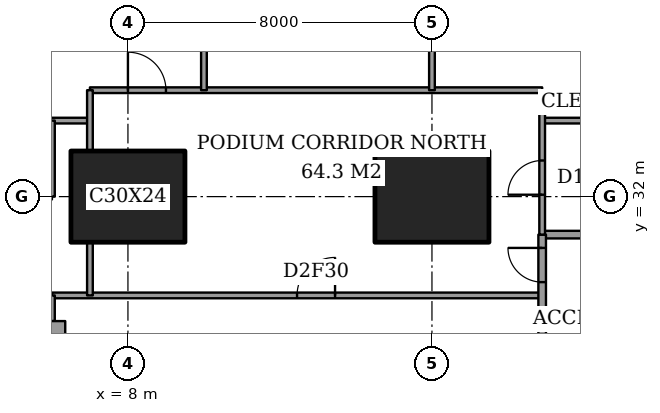
"""IFC4 building model, lengths in metres.
Left out: names, types, materials, properties, quantities, classifications, styles, units other than length and angle.
Written with IfcOpenShell. Run it as: python <this file> out.ifc"""

import sys

from ifc_helpers import new_model, si_unit, direction, frame, frame_2d, origin, origin_2d, place, context, subcontext, project, spatial, rectangle, extrude, element, fill, save


model = new_model("IFC4")
c1 = context("Model", 3, precision=1e-05, world=origin(), true_north=direction((0.0, 1.0)))
c2 = subcontext(c1, "Body", "Model", "MODEL_VIEW")
j1 = project(units=[si_unit("LENGTHUNIT", "METRE"), si_unit("PLANEANGLEUNIT", "RADIAN")], contexts=[c1])
p1 = place(None, origin())
s1 = spatial("IfcSite", under=j1, at=p1, CompositionType="ELEMENT")
p2 = place(p1, origin())
s2 = spatial("IfcBuilding", under=s1, at=p2, CompositionType="ELEMENT")
p3 = place(p2, frame((0.0, 0.0, 11.0)))
s3 = spatial("IfcBuildingStorey", under=s2, at=p3, CompositionType="ELEMENT", Elevation=11.0)
for number, where, z_axis, x_axis in (
    (1, (8.0, 32.0, 0.0), (0.0, 0.0, 1.0), (1.0, 0.0, 0.0)),
    (2, (16.0, 32.0, 0.0), (0.0, 0.0, 1.0), (1.0, 0.0, 0.0)),
):
    element("IfcColumn", number, at=place(p3, frame(where, z_axis=z_axis, x_axis=x_axis)), inside=s3, PredefinedType="COLUMN", context=c2, shape_type="SweptSolid", body=[
        extrude(rectangle(XDim=3.0, YDim=2.4, at=origin_2d()), origin(), (0.0, 0.0, 1.0), 5.0),
    ])
p4 = place(p3, frame((6.35, 28.35, 0.0), z_axis=(0.0, 0.0, 1.0), x_axis=(-1.0, 0.0, 0.0)))
e3 = element("IfcWall", 3, at=p4, inside=s3, PredefinedType="SHEAR", context=c2, shape_type="SweptSolid", body=[
    extrude(rectangle(XDim=4.45, YDim=0.75, at=frame_2d((2.225, 0.0))), origin(), (0.0, 0.0, 1.0), 5.0),
])
p5 = place(p3, frame((6.0, 29.4, 0.0), z_axis=(0.0, 0.0, 1.0), x_axis=(1.0, 0.0, 0.0)))
e4 = element("IfcWall", 4, at=p5, inside=s3, PredefinedType="PARTITIONING", context=c2, shape_type="SweptSolid", body=[
    extrude(rectangle(XDim=12.9, YDim=0.15, at=frame_2d((6.45, 0.0))), origin(), (0.0, 0.0, 1.0), 4.7),
])
p6 = place(p5, frame((6.45, 0.0, 0.0)))
e5 = element("IfcOpeningElement", 5, at=p6, cuts=e4, PredefinedType="OPENING", context=c2, shape_type="SweptSolid", body=[
    extrude(rectangle(XDim=1.0, YDim=2.1, at=frame_2d((0.5, 1.05))), frame((0.0, 0.085, 0.0), z_axis=(0.0, -1.0, 0.0), x_axis=(1.0, 0.0, 0.0)), (0.0, 0.0, 1.0), 0.17),
])
p7 = place(p3, frame((18.9, 31.0, 0.0), z_axis=(0.0, 0.0, 1.0), x_axis=(1.0, 0.0, 0.0)))
e6 = element("IfcWall", 6, at=p7, inside=s3, PredefinedType="PARTITIONING", context=c2, shape_type="SweptSolid", body=[
    extrude(rectangle(XDim=5.1, YDim=0.2, at=frame_2d((2.55, 0.0))), origin(), (0.0, 0.0, 1.0), 4.7),
])
p8 = place(p3, frame((5.0, 34.0, 0.0), z_axis=(0.0, 0.0, 1.0), x_axis=(1.0, 0.0, 0.0)))
e7 = element("IfcWall", 7, at=p8, inside=s3, PredefinedType="PARTITIONING", context=c2, shape_type="SweptSolid", body=[
    extrude(rectangle(XDim=2.0, YDim=0.15, at=frame_2d((1.0, 0.0))), origin(), (0.0, 0.0, 1.0), 4.7),
])
p9 = place(p3, frame((18.9, 34.0, 0.0), z_axis=(0.0, 0.0, 1.0), x_axis=(1.0, 0.0, 0.0)))
e8 = element("IfcWall", 8, at=p9, inside=s3, PredefinedType="PARTITIONING", context=c2, shape_type="SweptSolid", body=[
    extrude(rectangle(XDim=5.1, YDim=0.15, at=frame_2d((2.55, 0.0))), origin(), (0.0, 0.0, 1.0), 4.7),
])
p10 = place(p3, frame((7.0, 34.8, 0.0), z_axis=(0.0, 0.0, 1.0), x_axis=(1.0, 0.0, 0.0)))
e9 = element("IfcWall", 9, at=p10, inside=s3, PredefinedType="PARTITIONING", context=c2, shape_type="SweptSolid", body=[
    extrude(rectangle(XDim=11.9, YDim=0.15, at=frame_2d((5.95, 0.0))), origin(), (0.0, 0.0, 1.0), 4.7),
])
p11 = place(p10, frame((1.0, 0.0, 0.0)))
e10 = element("IfcOpeningElement", 10, at=p11, cuts=e9, PredefinedType="OPENING", context=c2, shape_type="SweptSolid", body=[
    extrude(rectangle(XDim=1.0, YDim=2.1, at=frame_2d((0.5, 1.05))), frame((0.0, 0.085, 0.0), z_axis=(0.0, -1.0, 0.0), x_axis=(1.0, 0.0, 0.0)), (0.0, 0.0, 1.0), 0.17),
])
p12 = place(p3, frame((6.0, 28.725, 0.0), z_axis=(0.0, 0.0, 1.0), x_axis=(0.0, 1.0, 0.0)))
e11 = element("IfcWall", 11, at=p12, inside=s3, PredefinedType="PARTITIONING", context=c2, shape_type="SweptSolid", body=[
    extrude(rectangle(XDim=0.675, YDim=0.15, at=frame_2d((0.337, 0.0))), origin(), (0.0, 0.0, 1.0), 4.7),
])
p13 = place(p3, frame((6.0, 32.0, 0.0), z_axis=(0.0, 0.0, 1.0), x_axis=(0.0, 1.0, 0.0)))
e12 = element("IfcWall", 12, at=p13, inside=s3, PredefinedType="PARTITIONING", context=c2, shape_type="SweptSolid", body=[
    extrude(rectangle(XDim=2.0, YDim=0.15, at=frame_2d((1.0, 0.0))), origin(), (0.0, 0.0, 1.0), 4.7),
])
p14 = place(p3, frame((7.0, 29.4, 0.0), z_axis=(0.0, 0.0, 1.0), x_axis=(0.0, 1.0, 0.0)))
e13 = element("IfcWall", 13, at=p14, inside=s3, PredefinedType="PARTITIONING", context=c2, shape_type="SweptSolid", body=[
    extrude(rectangle(XDim=1.4, YDim=0.15, at=frame_2d((0.7, 0.0))), origin(), (0.0, 0.0, 1.0), 4.7),
])
p15 = place(p3, frame((7.0, 33.2, 0.0), z_axis=(0.0, 0.0, 1.0), x_axis=(0.0, 1.0, 0.0)))
e14 = element("IfcWall", 14, at=p15, inside=s3, PredefinedType="PARTITIONING", context=c2, shape_type="SweptSolid", body=[
    extrude(rectangle(XDim=1.6, YDim=0.15, at=frame_2d((0.8, 0.0))), origin(), (0.0, 0.0, 1.0), 4.7),
])
p16 = place(p3, frame((10.0, 34.8, 0.0), z_axis=(0.0, 0.0, 1.0), x_axis=(0.0, 1.0, 0.0)))
e15 = element("IfcWall", 15, at=p16, inside=s3, PredefinedType="PARTITIONING", context=c2, shape_type="SweptSolid", body=[
    extrude(rectangle(XDim=21.761, YDim=0.15, at=frame_2d((10.88, 0.0))), origin(), (0.0, 0.0, 1.0), 4.7),
])
p17 = place(p16, frame((10.2, 0.0, 0.0)))
e16 = element("IfcOpeningElement", 16, at=p17, cuts=e15, PredefinedType="OPENING", context=c2, shape_type="SweptSolid", body=[
    extrude(rectangle(XDim=1.0, YDim=2.1, at=frame_2d((0.5, 1.05))), frame((0.0, 0.085, 0.0), z_axis=(0.0, -1.0, 0.0), x_axis=(1.0, 0.0, 0.0)), (0.0, 0.0, 1.0), 0.17),
])
p18 = place(p16, frame((3.1, 0.0, 0.0)))
e17 = element("IfcOpeningElement", 17, at=p18, cuts=e15, PredefinedType="OPENING", context=c2, shape_type="SweptSolid", body=[
    extrude(rectangle(XDim=1.8, YDim=2.1, at=frame_2d((0.9, 1.05))), frame((0.0, 0.085, 0.0), z_axis=(0.0, -1.0, 0.0), x_axis=(1.0, 0.0, 0.0)), (0.0, 0.0, 1.0), 0.17),
])
p19 = place(p3, frame((16.0, 34.8, 0.0), z_axis=(0.0, 0.0, 1.0), x_axis=(0.0, 1.0, 0.0)))
e18 = element("IfcWall", 18, at=p19, inside=s3, PredefinedType="PARTITIONING", context=c2, shape_type="SweptSolid", body=[
    extrude(rectangle(XDim=4.2, YDim=0.15, at=frame_2d((2.1, 0.0))), origin(), (0.0, 0.0, 1.0), 3.3),
])
p20 = place(p3, frame((18.9, 28.0, 0.0), z_axis=(0.0, 0.0, 1.0), x_axis=(0.0, 1.0, 0.0)))
e19 = element("IfcWall", 19, at=p20, inside=s3, PredefinedType="PARTITIONING", context=c2, shape_type="SweptSolid", body=[
    extrude(rectangle(XDim=3.0, YDim=0.2, at=frame_2d((1.5, 0.0))), origin(), (0.0, 0.0, 1.0), 4.7),
])
p21 = place(p20, frame((1.75, 0.0, 0.0)))
e20 = element("IfcOpeningElement", 20, at=p21, cuts=e19, PredefinedType="OPENING", context=c2, shape_type="SweptSolid", body=[
    extrude(rectangle(XDim=0.9, YDim=2.1, at=frame_2d((0.45, 1.05))), frame((0.0, 0.11, 0.0), z_axis=(0.0, -1.0, 0.0), x_axis=(1.0, 0.0, 0.0)), (0.0, 0.0, 1.0), 0.22),
])
p22 = place(p3, frame((18.9, 31.0, 0.0), z_axis=(0.0, 0.0, 1.0), x_axis=(0.0, 1.0, 0.0)))
e21 = element("IfcWall", 21, at=p22, inside=s3, PredefinedType="PARTITIONING", context=c2, shape_type="SweptSolid", body=[
    extrude(rectangle(XDim=3.8, YDim=0.15, at=frame_2d((1.9, 0.0))), origin(), (0.0, 0.0, 1.0), 4.7),
])
p23 = place(p22, frame((1.05, 0.0, 0.0)))
e22 = element("IfcOpeningElement", 22, at=p23, cuts=e21, PredefinedType="OPENING", context=c2, shape_type="SweptSolid", body=[
    extrude(rectangle(XDim=0.9, YDim=2.1, at=frame_2d((0.45, 1.05))), frame((0.0, 0.085, 0.0), z_axis=(0.0, -1.0, 0.0), x_axis=(1.0, 0.0, 0.0)), (0.0, 0.0, 1.0), 0.17),
])
p24 = place(p11, origin())
e23 = element("IfcDoor", 23, at=p24, inside=s3, OperationType="SINGLE_SWING_RIGHT", PredefinedType="DOOR", context=c2, shape_type="SweptSolid", body=[
    extrude(rectangle(XDim=1.0, YDim=2.1, at=frame_2d((0.5, 1.05))), frame((0.0, 0.025, 0.0), z_axis=(0.0, -1.0, 0.0), x_axis=(1.0, 0.0, 0.0)), (0.0, 0.0, 1.0), 0.05),
])
fill(e10, e23)
p25 = place(p21, origin())
e24 = element("IfcDoor", 24, at=p25, inside=s3, OperationType="SINGLE_SWING_LEFT", PredefinedType="DOOR", context=c2, shape_type="SweptSolid", body=[
    extrude(rectangle(XDim=0.9, YDim=2.1, at=frame_2d((0.45, 1.05))), frame((0.0, 0.025, 0.0), z_axis=(0.0, -1.0, 0.0), x_axis=(1.0, 0.0, 0.0)), (0.0, 0.0, 1.0), 0.05),
])
fill(e20, e24)
p26 = place(p6, origin())
e25 = element("IfcDoor", 25, at=p26, inside=s3, OperationType="SINGLE_SWING_LEFT", PredefinedType="DOOR", context=c2, shape_type="SweptSolid", body=[
    extrude(rectangle(XDim=1.0, YDim=2.1, at=frame_2d((0.5, 1.05))), frame((0.0, 0.025, 0.0), z_axis=(0.0, -1.0, 0.0), x_axis=(1.0, 0.0, 0.0)), (0.0, 0.0, 1.0), 0.05),
])
fill(e5, e25)
p27 = place(p23, origin())
e26 = element("IfcDoor", 26, at=p27, inside=s3, OperationType="SINGLE_SWING_RIGHT", PredefinedType="DOOR", context=c2, shape_type="SweptSolid", body=[
    extrude(rectangle(XDim=0.9, YDim=2.1, at=frame_2d((0.45, 1.05))), frame((0.0, 0.025, 0.0), z_axis=(0.0, -1.0, 0.0), x_axis=(1.0, 0.0, 0.0)), (0.0, 0.0, 1.0), 0.05),
])
fill(e22, e26)
save(model, sys.argv[1])
